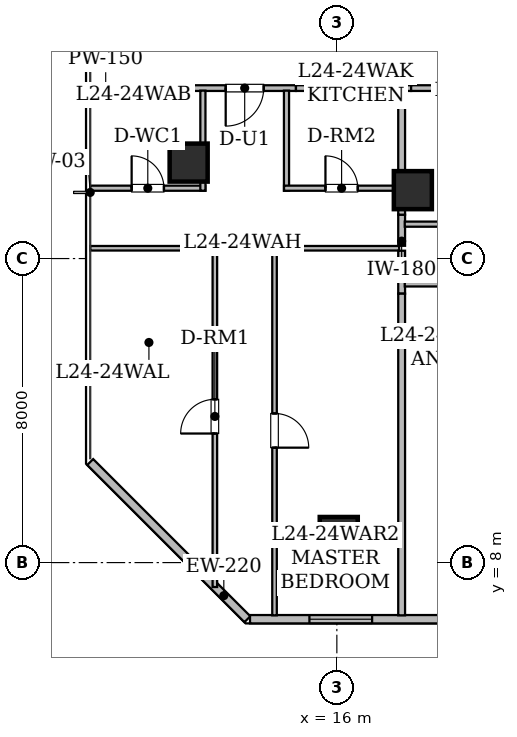
"""IFC4 building model, lengths in metres.
Left out: names, types, materials, properties, quantities, classifications, styles, units other than length and angle.
Written with IfcOpenShell. Run it as: python <this file> out.ifc"""

import sys

from ifc_helpers import new_model, si_unit, direction, frame, frame_2d, origin, origin_2d, place, context, subcontext, project, spatial, rectangle, hollow_rectangle, extrude, element, fill, save


model = new_model("IFC4")
c1 = context("Model", 3, precision=1e-05, world=origin(), true_north=direction((0.0, 1.0)))
c2 = subcontext(c1, "Body", "Model", "MODEL_VIEW")
j1 = project(units=[si_unit("LENGTHUNIT", "METRE"), si_unit("PLANEANGLEUNIT", "RADIAN")], contexts=[c1])
p1 = place(None, origin())
s1 = spatial("IfcSite", under=j1, at=p1, CompositionType="ELEMENT")
p2 = place(p1, origin())
s2 = spatial("IfcBuilding", under=s1, at=p2, CompositionType="ELEMENT")
p3 = place(p2, frame((0.0, 0.0, 98.25)))
s3 = spatial("IfcBuildingStorey", under=s2, at=p3, CompositionType="ELEMENT", Elevation=98.25)
for number, where, z_axis, x_axis in (
    (1, (16.05, 8.7, 0.0), (0.0, 0.0, 1.0), (1.0, 0.0, 0.0)),
    (2, (12.1, 18.525, 0.0), (0.0, 0.0, 1.0), (1.0, 0.0, 0.0)),
    (3, (18.0, 17.8, 0.0), (0.0, 0.0, 1.0), (1.0, 0.0, 0.0)),
):
    element("IfcColumn", number, at=place(p3, frame(where, z_axis=z_axis, x_axis=x_axis)), inside=s3, PredefinedType="COLUMN", context=c2, shape_type="SweptSolid", body=[
        extrude(hollow_rectangle(XDim=1.0, YDim=1.0, WallThickness=0.05, at=origin_2d()), origin(), (0.0, 0.0, 1.0), 3.65),
    ])
p4 = place(p3, frame((13.646, 6.51, 0.0), z_axis=(0.0, 0.0, 1.0), x_axis=(-0.707106781187, 0.707106781187, 0.0)))
e4 = element("IfcWall", 4, at=p4, inside=s3, PredefinedType="STANDARD", context=c2, shape_type="SweptSolid", body=[
    extrude(rectangle(XDim=5.849, YDim=0.22, at=frame_2d((2.925, 0.0))), origin(), (0.0, 0.0, 1.0), 3.43),
])
p5 = place(p3, frame((52.283, 6.51, 0.0), z_axis=(0.0, 0.0, 1.0), x_axis=(-1.0, 0.0, 0.0)))
e5 = element("IfcWall", 5, at=p5, inside=s3, PredefinedType="STANDARD", context=c2, shape_type="SweptSolid", body=[
    extrude(rectangle(XDim=38.568, YDim=0.22, at=frame_2d((19.284, 0.0))), origin(), (0.0, 0.0, 1.0), 3.43),
])
p6 = place(p5, frame((21.108, 0.0, 0.85)))
e6 = element("IfcOpeningElement", 6, at=p6, cuts=e5, PredefinedType="OPENING", context=c2, shape_type="SweptSolid", body=[
    extrude(rectangle(XDim=1.65, YDim=1.55, at=frame_2d((0.825, 0.775))), frame((0.0, 0.12, 0.0), z_axis=(0.0, -1.0, 0.0), x_axis=(1.0, 0.0, 0.0)), (0.0, 0.0, 1.0), 0.24),
])
p7 = place(p5, frame((35.355, 0.0, 0.85)))
e7 = element("IfcOpeningElement", 7, at=p7, cuts=e5, PredefinedType="OPENING", context=c2, shape_type="SweptSolid", body=[
    extrude(rectangle(XDim=1.65, YDim=1.55, at=frame_2d((0.825, 0.775))), frame((0.0, 0.12, 0.0), z_axis=(0.0, -1.0, 0.0), x_axis=(1.0, 0.0, 0.0)), (0.0, 0.0, 1.0), 0.24),
])
p8 = place(p5, frame((29.413, 0.0, 0.8)))
e8 = element("IfcOpeningElement", 8, at=p8, cuts=e5, PredefinedType="OPENING", context=c2, shape_type="SweptSolid", body=[
    extrude(rectangle(XDim=1.2, YDim=1.5, at=frame_2d((0.6, 0.75))), frame((0.0, 0.12, 0.0), z_axis=(0.0, -1.0, 0.0), x_axis=(1.0, 0.0, 0.0)), (0.0, 0.0, 1.0), 0.24),
])
p9 = place(p5, frame((31.863, 0.0, 0.85)))
e9 = element("IfcOpeningElement", 9, at=p9, cuts=e5, PredefinedType="OPENING", context=c2, shape_type="SweptSolid", body=[
    extrude(rectangle(XDim=1.65, YDim=1.55, at=frame_2d((0.825, 0.775))), frame((0.0, 0.12, 0.0), z_axis=(0.0, -1.0, 0.0), x_axis=(1.0, 0.0, 0.0)), (0.0, 0.0, 1.0), 0.24),
])
p10 = place(p5, frame((26.513, 0.0, 0.85)))
e10 = element("IfcOpeningElement", 10, at=p10, cuts=e5, PredefinedType="OPENING", context=c2, shape_type="SweptSolid", body=[
    extrude(rectangle(XDim=1.65, YDim=1.55, at=frame_2d((0.825, 0.775))), frame((0.0, 0.12, 0.0), z_axis=(0.0, -1.0, 0.0), x_axis=(1.0, 0.0, 0.0)), (0.0, 0.0, 1.0), 0.24),
])
p11 = place(p5, frame((13.843, 0.0, 0.85)))
e11 = element("IfcOpeningElement", 11, at=p11, cuts=e5, PredefinedType="OPENING", context=c2, shape_type="SweptSolid", body=[
    extrude(rectangle(XDim=1.65, YDim=1.55, at=frame_2d((0.825, 0.775))), frame((0.0, 0.12, 0.0), z_axis=(0.0, -1.0, 0.0), x_axis=(1.0, 0.0, 0.0)), (0.0, 0.0, 1.0), 0.24),
])
p12 = place(p5, frame((1.479, 0.0, 0.85)))
e12 = element("IfcOpeningElement", 12, at=p12, cuts=e5, PredefinedType="OPENING", context=c2, shape_type="SweptSolid", body=[
    extrude(rectangle(XDim=1.65, YDim=1.55, at=frame_2d((0.825, 0.775))), frame((0.0, 0.12, 0.0), z_axis=(0.0, -1.0, 0.0), x_axis=(1.0, 0.0, 0.0)), (0.0, 0.0, 1.0), 0.24),
])
p13 = place(p3, frame((14.924, 20.485, 0.0), z_axis=(0.0, 0.0, 1.0), x_axis=(-1.0, 0.0, 0.0)))
e13 = element("IfcWall", 13, at=p13, inside=s3, PredefinedType="STANDARD", context=c2, shape_type="SweptSolid", body=[
    extrude(rectangle(XDim=2.698, YDim=0.15, at=frame_2d((1.349, 0.0))), origin(), (0.0, 0.0, 1.0), 3.43),
])
p14 = place(p13, frame((0.849, 0.0, 0.0)))
e14 = element("IfcOpeningElement", 14, at=p14, cuts=e13, PredefinedType="OPENING", context=c2, shape_type="SweptSolid", body=[
    extrude(rectangle(XDim=1.0, YDim=2.15, at=frame_2d((0.5, 1.075))), frame((0.0, 0.085, 0.0), z_axis=(0.0, -1.0, 0.0), x_axis=(1.0, 0.0, 0.0)), (0.0, 0.0, 1.0), 0.17),
])
p15 = place(p3, frame((12.226, 20.485, 0.0), z_axis=(0.0, 0.0, 1.0), x_axis=(-1.0, 0.0, 0.0)))
e15 = element("IfcWall", 15, at=p15, inside=s3, PredefinedType="STANDARD", context=c2, shape_type="SweptSolid", body=[
    extrude(rectangle(XDim=2.716, YDim=0.15, at=frame_2d((1.358, 0.0))), origin(), (0.0, 0.0, 1.0), 2.876),
])
p16 = place(p3, frame((17.954, 20.485, 0.0), z_axis=(0.0, 0.0, 1.0), x_axis=(-1.0, 0.0, 0.0)))
e16 = element("IfcWall", 16, at=p16, inside=s3, PredefinedType="STANDARD", context=c2, shape_type="SweptSolid", body=[
    extrude(rectangle(XDim=3.03, YDim=0.15, at=frame_2d((1.515, 0.0))), origin(), (0.0, 0.0, 1.0), 2.647),
])
p17 = place(p3, frame((20.921, 20.485, 0.0), z_axis=(0.0, 0.0, 1.0), x_axis=(-1.0, 0.0, 0.0)))
e17 = element("IfcWall", 17, at=p17, inside=s3, PredefinedType="STANDARD", context=c2, shape_type="SweptSolid", body=[
    extrude(rectangle(XDim=2.967, YDim=0.15, at=frame_2d((1.483, 0.0))), origin(), (0.0, 0.0, 1.0), 2.647),
])
p18 = place(p3, frame((9.51, 17.851, 0.0), z_axis=(0.0, 0.0, 1.0), x_axis=(1.0, 0.0, 0.0)))
e18 = element("IfcWall", 18, at=p18, inside=s3, PredefinedType="PARTITIONING", context=c2, shape_type="SweptSolid", body=[
    extrude(rectangle(XDim=3.03, YDim=0.135, at=frame_2d((1.515, 0.0))), origin(), (0.0, 0.0, 1.0), 2.876),
])
p19 = place(p18, frame((1.09, 0.0, 0.0)))
e19 = element("IfcOpeningElement", 19, at=p19, cuts=e18, PredefinedType="OPENING", context=c2, shape_type="SweptSolid", body=[
    extrude(rectangle(XDim=0.85, YDim=2.1, at=frame_2d((0.425, 1.05))), frame((0.0, 0.077, 0.0), z_axis=(0.0, -1.0, 0.0), x_axis=(1.0, 0.0, 0.0)), (0.0, 0.0, 1.0), 0.155),
])
for number, where, z_axis, x_axis in (
    (20, (12.475, 17.786, 0.0), (0.0, 0.0, 1.0), (0.0, 1.0, 0.0)),
    (21, (14.675, 20.418, 0.0), (0.0, 0.0, 1.0), (0.0, -1.0, 0.0)),
):
    element("IfcWall", number, at=place(p3, frame(where, z_axis=z_axis, x_axis=x_axis)), inside=s3, PredefinedType="PARTITIONING", context=c2, shape_type="SweptSolid", body=[
        extrude(rectangle(XDim=2.632, YDim=0.135, at=frame_2d((1.316, 0.0))), origin(), (0.0, 0.0, 1.0), 2.647),
    ])
p20 = place(p3, frame((14.61, 17.851, 0.0), z_axis=(0.0, 0.0, 1.0), x_axis=(1.0, 0.0, 0.0)))
e22 = element("IfcWall", 22, at=p20, inside=s3, PredefinedType="PARTITIONING", context=c2, shape_type="SweptSolid", body=[
    extrude(rectangle(XDim=3.03, YDim=0.135, at=frame_2d((1.515, 0.0))), origin(), (0.0, 0.0, 1.0), 2.647),
])
p21 = place(p20, frame((1.09, 0.0, 0.0)))
e23 = element("IfcOpeningElement", 23, at=p21, cuts=e22, PredefinedType="OPENING", context=c2, shape_type="SweptSolid", body=[
    extrude(rectangle(XDim=0.85, YDim=2.1, at=frame_2d((0.425, 1.05))), frame((0.0, 0.077, 0.0), z_axis=(0.0, -1.0, 0.0), x_axis=(1.0, 0.0, 0.0)), (0.0, 0.0, 1.0), 0.155),
])
p22 = place(p3, frame((12.79, 7.357, 0.0), z_axis=(0.0, 0.0, 1.0), x_axis=(0.0, 1.0, 0.0)))
e24 = element("IfcWall", 24, at=p22, inside=s3, PredefinedType="PARTITIONING", context=c2, shape_type="SweptSolid", body=[
    extrude(rectangle(XDim=8.979, YDim=0.12, at=frame_2d((4.49, 0.0))), origin(), (0.0, 0.0, 1.0), 2.876),
])
p23 = place(p22, frame((4.039, 0.0, 0.0)))
e25 = element("IfcOpeningElement", 25, at=p23, cuts=e24, PredefinedType="OPENING", context=c2, shape_type="SweptSolid", body=[
    extrude(rectangle(XDim=0.9, YDim=2.1, at=frame_2d((0.45, 1.05))), frame((0.0, 0.07, 0.0), z_axis=(0.0, -1.0, 0.0), x_axis=(1.0, 0.0, 0.0)), (0.0, 0.0, 1.0), 0.14),
])
p24 = place(p3, frame((12.855, 16.271, 0.0), z_axis=(0.0, 0.0, 1.0), x_axis=(-1.0, 0.0, 0.0)))
e26 = element("IfcWall", 26, at=p24, inside=s3, PredefinedType="PARTITIONING", context=c2, shape_type="SweptSolid", body=[
    extrude(rectangle(XDim=3.345, YDim=0.12, at=frame_2d((1.672, 0.0))), origin(), (0.0, 0.0, 1.0), 3.43),
])
p25 = place(p3, frame((14.36, 16.336, 0.0), z_axis=(0.0, 0.0, 1.0), x_axis=(0.0, -1.0, 0.0)))
e27 = element("IfcWall", 27, at=p25, inside=s3, PredefinedType="PARTITIONING", context=c2, shape_type="SweptSolid", body=[
    extrude(rectangle(XDim=9.724, YDim=0.12, at=frame_2d((4.862, 0.0))), origin(), (0.0, 0.0, 1.0), 2.876),
])
p26 = place(p25, frame((4.412, 0.0, 0.0)))
e28 = element("IfcOpeningElement", 28, at=p26, cuts=e27, PredefinedType="OPENING", context=c2, shape_type="SweptSolid", body=[
    extrude(rectangle(XDim=0.9, YDim=2.1, at=frame_2d((0.45, 1.05))), frame((0.0, 0.07, 0.0), z_axis=(0.0, -1.0, 0.0), x_axis=(1.0, 0.0, 0.0)), (0.0, 0.0, 1.0), 0.14),
])
p27 = place(p3, frame((17.64, 16.271, 0.0), z_axis=(0.0, 0.0, 1.0), x_axis=(-1.0, 0.0, 0.0)))
e29 = element("IfcWall", 29, at=p27, inside=s3, PredefinedType="PARTITIONING", context=c2, shape_type="SweptSolid", body=[
    extrude(rectangle(XDim=3.345, YDim=0.12, at=frame_2d((1.672, 0.0))), origin(), (0.0, 0.0, 1.0), 2.647),
])
p28 = place(p3, frame((17.705, 17.154, 0.0), z_axis=(0.0, 0.0, 1.0), x_axis=(0.0, -1.0, 0.0)))
e30 = element("IfcWall", 30, at=p28, inside=s3, PredefinedType="STANDARD", context=c2, shape_type="SweptSolid", body=[
    extrude(rectangle(XDim=0.818, YDim=0.18, at=frame_2d((0.409, 0.0))), origin(), (0.0, 0.0, 1.0), 2.647),
])
p29 = place(p3, frame((17.705, 17.786, 0.0), z_axis=(0.0, 0.0, 1.0), x_axis=(0.0, -1.0, 0.0)))
e31 = element("IfcWall", 31, at=p29, inside=s3, PredefinedType="STANDARD", context=c2, shape_type="SweptSolid", body=[
    extrude(rectangle(XDim=0.632, YDim=0.18, at=frame_2d((0.316, 0.0))), origin(), (0.0, 0.0, 1.0), 2.647),
])
p30 = place(p3, frame((17.705, 20.418, 0.0), z_axis=(0.0, 0.0, 1.0), x_axis=(0.0, -1.0, 0.0)))
e32 = element("IfcWall", 32, at=p30, inside=s3, PredefinedType="STANDARD", context=c2, shape_type="SweptSolid", body=[
    extrude(rectangle(XDim=2.502, YDim=0.18, at=frame_2d((1.251, 0.0))), origin(), (0.0, 0.0, 1.0), 2.647),
])
p31 = place(p3, frame((17.705, 16.206, 0.0), z_axis=(0.0, 0.0, 1.0), x_axis=(0.0, -1.0, 0.0)))
e33 = element("IfcWall", 33, at=p31, inside=s3, PredefinedType="STANDARD", context=c2, shape_type="SweptSolid", body=[
    extrude(rectangle(XDim=1.13, YDim=0.18, at=frame_2d((0.565, 0.0))), origin(), (0.0, 0.0, 1.0), 2.647),
])
p32 = place(p3, frame((17.705, 15.076, 0.0), z_axis=(0.0, 0.0, 1.0), x_axis=(0.0, -1.0, 0.0)))
e34 = element("IfcWall", 34, at=p32, inside=s3, PredefinedType="STANDARD", context=c2, shape_type="SweptSolid", body=[
    extrude(rectangle(XDim=8.464, YDim=0.18, at=frame_2d((4.232, 0.0))), origin(), (0.0, 0.0, 1.0), 2.647),
])
p33 = place(p3, frame((17.787, 16.905, 0.0), z_axis=(0.0, 0.0, 1.0), x_axis=(1.0, 0.0, 0.0)))
e35 = element("IfcWall", 35, at=p33, inside=s3, PredefinedType="PARTITIONING", context=c2, shape_type="SweptSolid", body=[
    extrude(rectangle(XDim=3.448, YDim=0.135, at=frame_2d((1.724, 0.0))), origin(), (0.0, 0.0, 1.0), 2.647),
])
p34 = place(p3, frame((21.55, 15.325, 0.0), z_axis=(0.0, 0.0, 1.0), x_axis=(-1.0, 0.0, 0.0)))
e36 = element("IfcWall", 36, at=p34, inside=s3, PredefinedType="PARTITIONING", context=c2, shape_type="SweptSolid", body=[
    extrude(rectangle(XDim=3.763, YDim=0.12, at=frame_2d((1.881, 0.0))), origin(), (0.0, 0.0, 1.0), 3.43),
])
p35 = place(p7, origin())
e37 = element("IfcWindow", 37, at=p35, inside=s3, PartitioningType="SINGLE_PANEL", PredefinedType="WINDOW", context=c2, shape_type="SweptSolid", body=[
    extrude(rectangle(XDim=1.65, YDim=1.55, at=frame_2d((0.825, 0.775))), frame((0.0, 0.03, 0.0), z_axis=(0.0, -1.0, 0.0), x_axis=(1.0, 0.0, 0.0)), (0.0, 0.0, 1.0), 0.06),
])
fill(e7, e37)
p36 = place(p14, origin())
e38 = element("IfcDoor", 38, at=p36, inside=s3, OperationType="SINGLE_SWING_RIGHT", PredefinedType="DOOR", context=c2, shape_type="SweptSolid", body=[
    extrude(rectangle(XDim=1.0, YDim=2.15, at=frame_2d((0.5, 1.075))), frame((0.0, 0.025, 0.0), z_axis=(0.0, -1.0, 0.0), x_axis=(1.0, 0.0, 0.0)), (0.0, 0.0, 1.0), 0.05),
])
fill(e14, e38)
p37 = place(p19, origin())
e39 = element("IfcDoor", 39, at=p37, inside=s3, OperationType="SINGLE_SWING_LEFT", PredefinedType="DOOR", context=c2, shape_type="SweptSolid", body=[
    extrude(rectangle(XDim=0.85, YDim=2.1, at=frame_2d((0.425, 1.05))), frame((0.0, 0.025, 0.0), z_axis=(0.0, -1.0, 0.0), x_axis=(1.0, 0.0, 0.0)), (0.0, 0.0, 1.0), 0.05),
])
fill(e19, e39)
p38 = place(p21, origin())
e40 = element("IfcDoor", 40, at=p38, inside=s3, OperationType="SINGLE_SWING_LEFT", PredefinedType="DOOR", context=c2, shape_type="SweptSolid", body=[
    extrude(rectangle(XDim=0.85, YDim=2.1, at=frame_2d((0.425, 1.05))), frame((0.0, 0.025, 0.0), z_axis=(0.0, -1.0, 0.0), x_axis=(1.0, 0.0, 0.0)), (0.0, 0.0, 1.0), 0.05),
])
fill(e23, e40)
p39 = place(p23, origin())
e41 = element("IfcDoor", 41, at=p39, inside=s3, OperationType="SINGLE_SWING_LEFT", PredefinedType="DOOR", context=c2, shape_type="SweptSolid", body=[
    extrude(rectangle(XDim=0.9, YDim=2.1, at=frame_2d((0.45, 1.05))), frame((0.0, 0.025, 0.0), z_axis=(0.0, -1.0, 0.0), x_axis=(1.0, 0.0, 0.0)), (0.0, 0.0, 1.0), 0.05),
])
fill(e25, e41)
p40 = place(p26, origin())
e42 = element("IfcDoor", 42, at=p40, inside=s3, OperationType="SINGLE_SWING_RIGHT", PredefinedType="DOOR", context=c2, shape_type="SweptSolid", body=[
    extrude(rectangle(XDim=0.9, YDim=2.1, at=frame_2d((0.45, 1.05))), frame((0.0, 0.025, 0.0), z_axis=(0.0, -1.0, 0.0), x_axis=(1.0, 0.0, 0.0)), (0.0, 0.0, 1.0), 0.05),
])
fill(e28, e42)
save(model, sys.argv[1])
